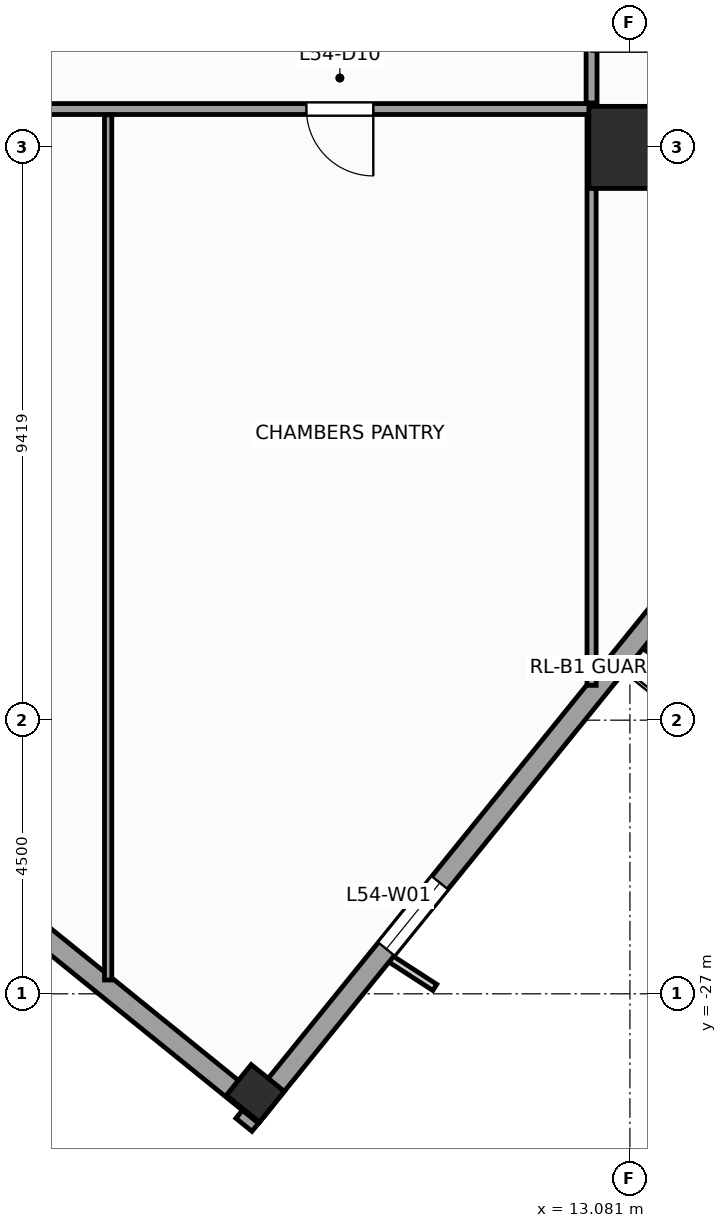
"""IFC4 building model, lengths in metres.
Left out: names, types, materials, properties, quantities, classifications, styles, units other than length and angle.
Written with IfcOpenShell. Run it as: python <this file> out.ifc"""

import sys

from ifc_helpers import new_model, si_unit, direction, frame, frame_2d, origin, origin_2d, place, context, subcontext, project, spatial, rectangle, extrude, source, transform, mapped, element, fill, save


model = new_model("IFC4")
c1 = context("Model", 3, precision=1e-05, world=origin(), true_north=direction((0.0, 1.0)))
c2 = subcontext(c1, "Body", "Model", "MODEL_VIEW")
j1 = project(units=[si_unit("LENGTHUNIT", "METRE"), si_unit("PLANEANGLEUNIT", "RADIAN")], contexts=[c1])
p1 = place(None, origin())
s1 = spatial("IfcSite", under=j1, at=p1, CompositionType="ELEMENT")
p2 = place(p1, origin())
s2 = spatial("IfcBuilding", under=s1, at=p2, CompositionType="ELEMENT")
p3 = place(p2, frame((0.0, 0.0, 225.1)))
s3 = spatial("IfcBuildingStorey", under=s2, at=p3, CompositionType="ELEMENT", Elevation=225.1)
m1 = source(origin(), c2, "Body", "SweptSolid", [
    extrude(rectangle(XDim=1.35, YDim=1.35, at=origin_2d()), origin(), (0.0, 0.0, 1.0), 3.9),
])
p4 = place(p3, frame((13.081, -13.081, 0.0), z_axis=(0.0, 0.0, 1.0), x_axis=(1.0, 0.0, 0.0)))
e1 = element("IfcColumn", 1, at=p4, inside=s3, PredefinedType="COLUMN", context=c2, shape_type="MappedRepresentation", body=[
    mapped(m1, transform((0.0, 0.0, 0.0), scale=1.0)),
])
m2 = source(origin(), c2, "Body", "SweptSolid", [
    extrude(rectangle(XDim=0.65, YDim=0.7, at=origin_2d()), origin(), (0.0, 0.0, 1.0), 3.9),
])
p5 = place(p3, frame((6.92, -28.637, 0.0), z_axis=(0.0, 0.0, 1.0), x_axis=(0.62932039105, 0.777145961457, 0.0)))
e2 = element("IfcColumn", 2, at=p5, inside=s3, PredefinedType="COLUMN", context=c2, shape_type="MappedRepresentation", body=[
    mapped(m2, transform((0.0, 0.0, 0.0), scale=1.0)),
])
p6 = place(p3, frame((6.733, -29.154, 0.0), z_axis=(0.0, 0.0, 1.0), x_axis=(0.629325378072, 0.77714192302, 0.0)))
e3 = element("IfcWall", 3, at=p6, inside=s3, PredefinedType="STANDARD", context=c2, shape_type="SweptSolid", body=[
    extrude(rectangle(XDim=36.84, YDim=0.34, at=frame_2d((18.42, 0.0))), origin(), (0.0, 0.0, 1.0), 2.96),
])
p7 = place(p6, frame((12.295, 0.0, 0.0)))
e4 = element("IfcOpeningElement", 4, at=p7, cuts=e3, PredefinedType="OPENING", context=c2, shape_type="SweptSolid", body=[
    extrude(rectangle(XDim=1.05, YDim=2.25, at=frame_2d((0.525, 1.125))), frame((0.0, 0.18, 0.0), z_axis=(0.0, -1.0, 0.0), x_axis=(1.0, 0.0, 0.0)), (0.0, 0.0, 1.0), 0.36),
])
p8 = place(p6, frame((3.721, 0.0, 0.48)))
e5 = element("IfcOpeningElement", 5, at=p8, cuts=e3, PredefinedType="OPENING", context=c2, shape_type="SweptSolid", body=[
    extrude(rectangle(XDim=1.4, YDim=2.4, at=frame_2d((0.7, 1.2))), frame((0.0, 0.18, 0.0), z_axis=(0.0, -1.0, 0.0), x_axis=(1.0, 0.0, 0.0)), (0.0, 0.0, 1.0), 0.36),
])
p9 = place(p6, frame((16.058, 0.0, 0.58)))
e6 = element("IfcOpeningElement", 6, at=p9, cuts=e3, PredefinedType="OPENING", context=c2, shape_type="SweptSolid", body=[
    extrude(rectangle(XDim=1.75, YDim=2.3, at=frame_2d((0.875, 1.15))), frame((0.0, 0.18, 0.0), z_axis=(0.0, -1.0, 0.0), x_axis=(1.0, 0.0, 0.0)), (0.0, 0.0, 1.0), 0.36),
])
p10 = place(p6, frame((24.176, 0.0, 0.58)))
e7 = element("IfcOpeningElement", 7, at=p10, cuts=e3, PredefinedType="OPENING", context=c2, shape_type="SweptSolid", body=[
    extrude(rectangle(XDim=1.75, YDim=2.3, at=frame_2d((0.875, 1.15))), frame((0.0, 0.18, 0.0), z_axis=(0.0, -1.0, 0.0), x_axis=(1.0, 0.0, 0.0)), (0.0, 0.0, 1.0), 0.36),
])
p11 = place(p6, frame((30.982, 0.0, 0.48)))
e8 = element("IfcOpeningElement", 8, at=p11, cuts=e3, PredefinedType="OPENING", context=c2, shape_type="SweptSolid", body=[
    extrude(rectangle(XDim=1.4, YDim=2.4, at=frame_2d((0.7, 1.2))), frame((0.0, 0.18, 0.0), z_axis=(0.0, -1.0, 0.0), x_axis=(1.0, 0.0, 0.0)), (0.0, 0.0, 1.0), 0.36),
])
p12 = place(p3, frame((2.673, -25.429, 0.0), z_axis=(0.0, 0.0, 1.0), x_axis=(0.777162640055, -0.629299794138, 0.0)))
e9 = element("IfcWall", 9, at=p12, inside=s3, PredefinedType="STANDARD", context=c2, shape_type="SweptSolid", body=[
    extrude(rectangle(XDim=5.67, YDim=0.34, at=frame_2d((2.835, 0.0))), origin(), (0.0, 0.0, 1.0), 3.66),
])
p13 = place(p3, frame((-12.45, -12.45, 0.0), z_axis=(0.0, 0.0, 1.0), x_axis=(1.0, 0.0, 0.0)))
e10 = element("IfcWall", 10, at=p13, inside=s3, PredefinedType="PARTITIONING", context=c2, shape_type="SweptSolid", body=[
    extrude(rectangle(XDim=24.9, YDim=0.18, at=frame_2d((12.45, 0.0))), origin(), (0.0, 0.0, 1.0), 3.66),
])
p14 = place(p13, frame((4.839, 0.0, 0.0)))
e11 = element("IfcOpeningElement", 11, at=p14, cuts=e10, PredefinedType="OPENING", context=c2, shape_type="SweptSolid", body=[
    extrude(rectangle(XDim=1.1, YDim=2.2, at=frame_2d((0.55, 1.1))), frame((0.0, 0.1, 0.0), z_axis=(0.0, -1.0, 0.0), x_axis=(1.0, 0.0, 0.0)), (0.0, 0.0, 1.0), 0.2),
])
p15 = place(p13, frame((13.15, 0.0, 0.0)))
e12 = element("IfcOpeningElement", 12, at=p15, cuts=e10, PredefinedType="OPENING", context=c2, shape_type="SweptSolid", body=[
    extrude(rectangle(XDim=1.1, YDim=2.2, at=frame_2d((0.55, 1.1))), frame((0.0, 0.1, 0.0), z_axis=(0.0, -1.0, 0.0), x_axis=(1.0, 0.0, 0.0)), (0.0, 0.0, 1.0), 0.2),
])
p16 = place(p13, frame((20.21, 0.0, 0.0)))
e13 = element("IfcOpeningElement", 13, at=p16, cuts=e10, PredefinedType="OPENING", context=c2, shape_type="SweptSolid", body=[
    extrude(rectangle(XDim=1.1, YDim=2.2, at=frame_2d((0.55, 1.1))), frame((0.0, 0.1, 0.0), z_axis=(0.0, -1.0, 0.0), x_axis=(1.0, 0.0, 0.0)), (0.0, 0.0, 1.0), 0.2),
])
p17 = place(p3, frame((12.45, -12.35, 0.0), z_axis=(0.0, 0.0, 1.0), x_axis=(0.0, 1.0, 0.0)))
e14 = element("IfcWall", 14, at=p17, inside=s3, PredefinedType="PARTITIONING", context=c2, shape_type="SweptSolid", body=[
    extrude(rectangle(XDim=16.15, YDim=0.18, at=frame_2d((8.075, 0.0))), origin(), (0.0, 0.0, 1.0), 3.66),
])
p18 = place(p17, frame((1.58, 0.0, 0.0)))
e15 = element("IfcOpeningElement", 15, at=p18, cuts=e14, PredefinedType="OPENING", context=c2, shape_type="SweptSolid", body=[
    extrude(rectangle(XDim=0.95, YDim=2.1, at=frame_2d((0.475, 1.05))), frame((0.0, 0.1, 0.0), z_axis=(0.0, -1.0, 0.0), x_axis=(1.0, 0.0, 0.0)), (0.0, 0.0, 1.0), 0.2),
])
p19 = place(p17, frame((14.111, 0.0, 0.0)))
e16 = element("IfcOpeningElement", 16, at=p19, cuts=e14, PredefinedType="OPENING", context=c2, shape_type="SweptSolid", body=[
    extrude(rectangle(XDim=1.1, YDim=2.2, at=frame_2d((0.55, 1.1))), frame((0.0, 0.1, 0.0), z_axis=(0.0, -1.0, 0.0), x_axis=(1.0, 0.0, 0.0)), (0.0, 0.0, 1.0), 0.2),
])
p20 = place(p17, frame((7.784, 0.0, 0.0)))
e17 = element("IfcOpeningElement", 17, at=p20, cuts=e14, PredefinedType="OPENING", context=c2, shape_type="SweptSolid", body=[
    extrude(rectangle(XDim=1.1, YDim=2.2, at=frame_2d((0.55, 1.1))), frame((0.0, 0.1, 0.0), z_axis=(0.0, -1.0, 0.0), x_axis=(1.0, 0.0, 0.0)), (0.0, 0.0, 1.0), 0.2),
])
p21 = place(p3, frame((4.5, -26.773, 0.0), z_axis=(0.0, 0.0, 1.0), x_axis=(0.0, 1.0, 0.0)))
e18 = element("IfcWall", 18, at=p21, inside=s3, PredefinedType="PARTITIONING", context=c2, shape_type="SweptSolid", body=[
    extrude(rectangle(XDim=14.229, YDim=0.12, at=frame_2d((7.114, 0.0))), origin(), (0.0, 0.0, 1.0), 3.66),
])
p22 = place(p3, frame((12.45, -21.928, 0.0), z_axis=(0.0, 0.0, 1.0), x_axis=(0.0, 1.0, 0.0)))
e19 = element("IfcWall", 19, at=p22, inside=s3, PredefinedType="PARTITIONING", context=c2, shape_type="SweptSolid", body=[
    extrude(rectangle(XDim=9.383, YDim=0.15, at=frame_2d((4.691, 0.0))), origin(), (0.0, 0.0, 1.0), 2.96),
])
m3 = source(origin(), c2, "Body", "SweptSolid", [
    extrude(rectangle(XDim=1.4, YDim=2.4, at=frame_2d((0.7, 1.2))), frame((0.0, 0.03, 0.0), z_axis=(0.0, -1.0, 0.0), x_axis=(1.0, 0.0, 0.0)), (0.0, 0.0, 1.0), 0.06),
])
p23 = place(p8, origin())
e20 = element("IfcWindow", 20, at=p23, inside=s3, PartitioningType="SINGLE_PANEL", PredefinedType="WINDOW", context=c2, shape_type="MappedRepresentation", body=[
    mapped(m3, transform((0.0, 0.0, 0.0), scale=1.0)),
])
fill(e5, e20)
m4 = source(origin(), c2, "Body", "SweptSolid", [
    extrude(rectangle(XDim=1.1, YDim=2.2, at=frame_2d((0.55, 1.1))), frame((0.0, 0.025, 0.0), z_axis=(0.0, -1.0, 0.0), x_axis=(1.0, 0.0, 0.0)), (0.0, 0.0, 1.0), 0.05),
])
p24 = place(p16, frame((1.1, 0.0, 0.0), z_axis=(0.0, 0.0, 1.0), x_axis=(-1.0, 0.0, 0.0)))
e21 = element("IfcDoor", 21, at=p24, inside=s3, OperationType="SINGLE_SWING_RIGHT", PredefinedType="DOOR", context=c2, shape_type="MappedRepresentation", body=[
    mapped(m4, transform((0.0, 0.0, 0.0), scale=1.0)),
])
fill(e13, e21)
save(model, sys.argv[1])
